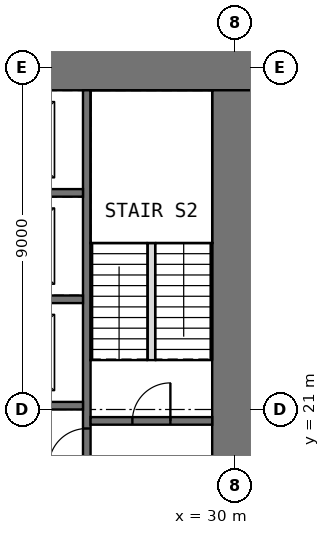
"""IFC4 building model, lengths in metres.
Left out: names, types, materials, properties, quantities, classifications, styles, units other than length and angle.
Written with IfcOpenShell. Run it as: python <this file> out.ifc"""

import sys

from ifc_helpers import new_model, si_unit, direction, frame, frame_2d, origin, place, context, subcontext, project, spatial, rectangle, extrude, element, fill, save


model = new_model("IFC4")
c1 = context("Model", 3, precision=1e-05, world=origin(), true_north=direction((0.0, 1.0)))
c2 = subcontext(c1, "Body", "Model", "MODEL_VIEW")
j1 = project(units=[si_unit("LENGTHUNIT", "METRE"), si_unit("PLANEANGLEUNIT", "RADIAN")], contexts=[c1])
p1 = place(None, origin())
s1 = spatial("IfcSite", under=j1, at=p1, CompositionType="ELEMENT")
p2 = place(p1, origin())
s2 = spatial("IfcBuilding", under=s1, at=p2, CompositionType="ELEMENT")
p3 = place(p2, frame((0.0, 0.0, 30.5)))
s3 = spatial("IfcBuildingStorey", under=s2, at=p3, CompositionType="ELEMENT", Elevation=30.5)
p4 = place(p3, frame((10.8, 30.3, -0.05), z_axis=(0.0, 0.0, 1.0), x_axis=(1.0, 0.0, 0.0)))
e1 = element("IfcWall", 1, at=p4, inside=s3, PredefinedType="SHEAR", context=c2, shape_type="SweptSolid", body=[
    extrude(rectangle(XDim=20.4, YDim=1.8, at=frame_2d((10.2, 0.0))), origin(), (0.0, 0.0, 1.0), 4.0),
])
p5 = place(p4, frame((9.2, 0.0, 0.05)))
e2 = element("IfcOpeningElement", 2, at=p5, cuts=e1, PredefinedType="OPENING", context=c2, shape_type="SweptSolid", body=[
    extrude(rectangle(XDim=2.0, YDim=2.2, at=frame_2d((1.0, 1.1))), frame((0.0, 0.91, 0.0), z_axis=(0.0, -1.0, 0.0), x_axis=(1.0, 0.0, 0.0)), (0.0, 0.0, 1.0), 1.82),
])
p6 = place(p3, frame((30.3, 12.6, -0.05), z_axis=(0.0, 0.0, 1.0), x_axis=(0.0, 1.0, 0.0)))
e3 = element("IfcWall", 3, at=p6, inside=s3, PredefinedType="SHEAR", context=c2, shape_type="SweptSolid", body=[
    extrude(rectangle(XDim=16.8, YDim=1.8, at=frame_2d((8.4, 0.0))), origin(), (0.0, 0.0, 1.0), 4.0),
])
p7 = place(p6, frame((5.9, 0.0, 0.05)))
e4 = element("IfcOpeningElement", 4, at=p7, cuts=e3, PredefinedType="OPENING", context=c2, shape_type="SweptSolid", body=[
    extrude(rectangle(XDim=1.0, YDim=2.2, at=frame_2d((0.5, 1.1))), frame((0.0, 0.91, 0.0), z_axis=(0.0, -1.0, 0.0), x_axis=(1.0, 0.0, 0.0)), (0.0, 0.0, 1.0), 1.82),
])
p8 = place(p3, frame((26.1, 12.6, -0.05), z_axis=(0.0, 0.0, 1.0), x_axis=(0.0, 1.0, 0.0)))
e5 = element("IfcWall", 5, at=p8, inside=s3, PredefinedType="SHEAR", context=c2, shape_type="SweptSolid", body=[
    extrude(rectangle(XDim=16.8, YDim=0.2, at=frame_2d((8.4, 0.0))), origin(), (0.0, 0.0, 1.0), 4.0),
])
p9 = place(p8, frame((6.9, 0.0, 0.05)))
e6 = element("IfcOpeningElement", 6, at=p9, cuts=e5, PredefinedType="OPENING", context=c2, shape_type="SweptSolid", body=[
    extrude(rectangle(XDim=1.0, YDim=2.2, at=frame_2d((0.5, 1.1))), frame((0.0, 0.11, 0.0), z_axis=(0.0, -1.0, 0.0), x_axis=(1.0, 0.0, 0.0)), (0.0, 0.0, 1.0), 0.22),
])
for number, where, z_axis, x_axis in (
    (7, (22.8, 21.1, -0.05), (0.0, 0.0, 1.0), (1.0, 0.0, 0.0)),
    (8, (22.8, 23.9, -0.05), (0.0, 0.0, 1.0), (1.0, 0.0, 0.0)),
    (9, (22.8, 26.7, -0.05), (0.0, 0.0, 1.0), (1.0, 0.0, 0.0)),
):
    element("IfcWall", number, at=place(p3, frame(where, z_axis=z_axis, x_axis=x_axis)), inside=s3, PredefinedType="SHEAR", context=c2, shape_type="SweptSolid", body=[
        extrude(rectangle(XDim=3.2, YDim=0.2, at=frame_2d((1.6, 0.0))), origin(), (0.0, 0.0, 1.0), 4.0),
    ])
p10 = place(p3, frame((26.2, 20.7, -0.05), z_axis=(0.0, 0.0, 1.0), x_axis=(1.0, 0.0, 0.0)))
e10 = element("IfcWall", 10, at=p10, inside=s3, PredefinedType="SHEAR", context=c2, shape_type="SweptSolid", body=[
    extrude(rectangle(XDim=3.2, YDim=0.2, at=frame_2d((1.6, 0.0))), origin(), (0.0, 0.0, 1.0), 4.0),
])
p11 = place(p10, frame((1.1, 0.0, 0.05)))
e11 = element("IfcOpeningElement", 11, at=p11, cuts=e10, PredefinedType="OPENING", context=c2, shape_type="SweptSolid", body=[
    extrude(rectangle(XDim=1.0, YDim=2.2, at=frame_2d((0.5, 1.1))), frame((0.0, 0.11, 0.0), z_axis=(0.0, -1.0, 0.0), x_axis=(1.0, 0.0, 0.0)), (0.0, 0.0, 1.0), 0.22),
])
p12 = place(p3, frame((27.8, 22.3, 0.0), z_axis=(0.0, 0.0, 1.0), x_axis=(0.0, 1.0, 0.0)))
e12 = element("IfcWall", 12, at=p12, inside=s3, PredefinedType="PARTITIONING", context=c2, shape_type="SweptSolid", body=[
    extrude(rectangle(XDim=3.08, YDim=0.2, at=frame_2d((1.54, 0.0))), origin(), (0.0, 0.0, 1.0), 4.0),
])
p13 = place(p11, origin())
e13 = element("IfcDoor", 13, at=p13, inside=s3, OperationType="SINGLE_SWING_RIGHT", PredefinedType="DOOR", context=c2, shape_type="SweptSolid", body=[
    extrude(rectangle(XDim=1.0, YDim=2.2, at=frame_2d((0.5, 1.1))), frame((0.0, 0.025, 0.0), z_axis=(0.0, -1.0, 0.0), x_axis=(1.0, 0.0, 0.0)), (0.0, 0.0, 1.0), 0.05),
])
fill(e11, e13)
p14 = place(p9, origin())
e14 = element("IfcDoor", 14, at=p14, inside=s3, OperationType="SINGLE_SWING_LEFT", PredefinedType="DOOR", context=c2, shape_type="SweptSolid", body=[
    extrude(rectangle(XDim=1.0, YDim=2.2, at=frame_2d((0.5, 1.1))), frame((0.0, 0.025, 0.0), z_axis=(0.0, -1.0, 0.0), x_axis=(1.0, 0.0, 0.0)), (0.0, 0.0, 1.0), 0.05),
])
fill(e6, e14)
save(model, sys.argv[1])
